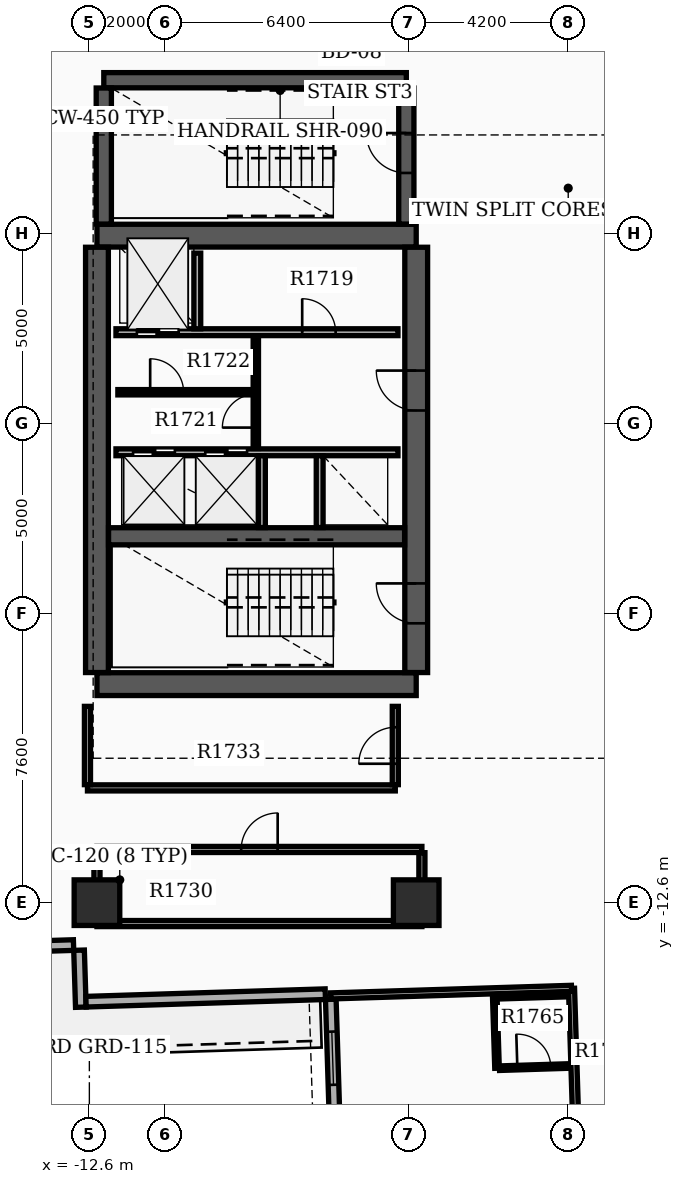
"""IFC4 building model, lengths in metres.
Left out: names, types, materials, properties, quantities, classifications, styles, units other than length and angle.
Written with IfcOpenShell. Run it as: python <this file> out.ifc"""

import sys

from ifc_helpers import new_model, si_unit, direction, frame, frame_2d, origin, origin_2d, place, context, subcontext, project, spatial, rectangle, extrude, element, fill, save


model = new_model("IFC4")
c1 = context("Model", 3, precision=1e-05, world=origin(), true_north=direction((0.0, 1.0)))
c2 = subcontext(c1, "Body", "Model", "MODEL_VIEW")
j1 = project(units=[si_unit("LENGTHUNIT", "METRE"), si_unit("PLANEANGLEUNIT", "RADIAN")], contexts=[c1])
p1 = place(None, origin())
s1 = spatial("IfcSite", under=j1, at=p1, CompositionType="ELEMENT")
p2 = place(p1, origin())
s2 = spatial("IfcBuilding", under=s1, at=p2, CompositionType="ELEMENT")
p3 = place(p2, frame((0.0, 0.0, 112.5)))
s3 = spatial("IfcBuildingStorey", under=s2, at=p3, CompositionType="ELEMENT", Elevation=112.5)
for number, where, z_axis, x_axis in (
    (1, (-12.4, -6.85, 0.0), (0.0, 0.0, 1.0), (1.0, 0.0, 0.0)),
    (2, (-12.4, 4.95, 0.0), (0.0, 0.0, 1.0), (1.0, 0.0, 0.0)),
):
    element("IfcWall", number, at=place(p3, frame(where, z_axis=z_axis, x_axis=x_axis)), inside=s3, PredefinedType="SHEAR", context=c2, shape_type="SweptSolid", body=[
        extrude(rectangle(XDim=8.4, YDim=0.6, at=frame_2d((4.2, 0.0))), origin(), (0.0, 0.0, 1.0), 3.7),
    ])
p4 = place(p3, frame((-12.4, -6.545, 0.0), z_axis=(0.0, 0.0, 1.0), x_axis=(0.0, 1.0, 0.0)))
e3 = element("IfcWall", 3, at=p4, inside=s3, PredefinedType="SHEAR", context=c2, shape_type="SweptSolid", body=[
    extrude(rectangle(XDim=11.19, YDim=0.6, at=frame_2d((5.595, 0.0))), origin(), (0.0, 0.0, 1.0), 3.7),
])
p5 = place(p3, frame((-4.0, -6.545, 0.0), z_axis=(0.0, 0.0, 1.0), x_axis=(0.0, 1.0, 0.0)))
e4 = element("IfcWall", 4, at=p5, inside=s3, PredefinedType="SHEAR", context=c2, shape_type="SweptSolid", body=[
    extrude(rectangle(XDim=11.19, YDim=0.6, at=frame_2d((5.595, 0.0))), origin(), (0.0, 0.0, 1.0), 3.7),
])
p6 = place(p5, frame((1.295, 0.0, 0.0)))
e5 = element("IfcOpeningElement", 5, at=p6, cuts=e4, PredefinedType="OPENING", context=c2, shape_type="SweptSolid", body=[
    extrude(rectangle(XDim=1.05, YDim=2.15, at=frame_2d((0.525, 1.075))), frame((0.0, 0.31, 0.0), z_axis=(0.0, -1.0, 0.0), x_axis=(1.0, 0.0, 0.0)), (0.0, 0.0, 1.0), 0.62),
])
p7 = place(p5, frame((6.895, 0.0, 0.0)))
e6 = element("IfcOpeningElement", 6, at=p7, cuts=e4, PredefinedType="OPENING", context=c2, shape_type="SweptSolid", body=[
    extrude(rectangle(XDim=1.05, YDim=2.15, at=frame_2d((0.525, 1.075))), frame((0.0, 0.31, 0.0), z_axis=(0.0, -1.0, 0.0), x_axis=(1.0, 0.0, 0.0)), (0.0, 0.0, 1.0), 0.62),
])
p8 = place(p3, frame((-12.095, -2.96, 0.0), z_axis=(0.0, 0.0, 1.0), x_axis=(1.0, 0.0, 0.0)))
e7 = element("IfcWall", 7, at=p8, inside=s3, PredefinedType="SHEAR", context=c2, shape_type="SweptSolid", body=[
    extrude(rectangle(XDim=7.79, YDim=0.45, at=frame_2d((3.895, 0.0))), origin(), (0.0, 0.0, 1.0), 3.7),
])
p9 = place(p3, frame((-12.22, 9.04, 0.0), z_axis=(0.0, 0.0, 1.0), x_axis=(1.0, 0.0, 0.0)))
e8 = element("IfcWall", 8, at=p9, inside=s3, PredefinedType="SHEAR", context=c2, shape_type="SweptSolid", body=[
    extrude(rectangle(XDim=7.96, YDim=0.4, at=frame_2d((3.98, 0.0))), origin(), (0.0, 0.0, 1.0), 3.7),
])
p10 = place(p3, frame((-12.22, 5.255, 0.0), z_axis=(0.0, 0.0, 1.0), x_axis=(0.0, 1.0, 0.0)))
e9 = element("IfcWall", 9, at=p10, inside=s3, PredefinedType="SHEAR", context=c2, shape_type="SweptSolid", body=[
    extrude(rectangle(XDim=3.58, YDim=0.4, at=frame_2d((1.79, 0.0))), origin(), (0.0, 0.0, 1.0), 3.7),
])
p11 = place(p3, frame((-4.26, 5.255, 0.0), z_axis=(0.0, 0.0, 1.0), x_axis=(0.0, 1.0, 0.0)))
e10 = element("IfcWall", 10, at=p11, inside=s3, PredefinedType="SHEAR", context=c2, shape_type="SweptSolid", body=[
    extrude(rectangle(XDim=3.58, YDim=0.4, at=frame_2d((1.79, 0.0))), origin(), (0.0, 0.0, 1.0), 3.7),
])
p12 = place(p11, frame((1.345, 0.0, 0.0)))
e11 = element("IfcOpeningElement", 11, at=p12, cuts=e10, PredefinedType="OPENING", context=c2, shape_type="SweptSolid", body=[
    extrude(rectangle(XDim=1.05, YDim=2.15, at=frame_2d((0.525, 1.075))), frame((0.0, 0.21, 0.0), z_axis=(0.0, -1.0, 0.0), x_axis=(1.0, 0.0, 0.0)), (0.0, 0.0, 1.0), 0.42),
])
for number, where, z_axis, x_axis in (
    (12, (-12.4, -12.6, 0.0), (0.0, 0.0, 1.0), (1.0, 0.0, 0.0)),
    (13, (-4.0, -12.6, 0.0), (0.0, 0.0, 1.0), (1.0, 0.0, 0.0)),
):
    element("IfcColumn", number, at=place(p3, frame(where, z_axis=z_axis, x_axis=x_axis)), inside=s3, PredefinedType="COLUMN", context=c2, shape_type="SweptSolid", body=[
        extrude(rectangle(XDim=1.2, YDim=1.2, at=origin_2d()), origin(), (0.0, 0.0, 1.0), 3.9),
    ])
p13 = place(p3, frame((-6.247, -15.144, 0.0), z_axis=(0.0, 0.0, 1.0), x_axis=(0.031398187845, -0.999506955354, 0.0)))
e14 = element("IfcWall", 14, at=p13, inside=s3, PredefinedType="STANDARD", context=c2, shape_type="SweptSolid", body=[
    extrude(rectangle(XDim=20.1, YDim=0.28, at=frame_2d((10.05, 0.0))), origin(), (0.0, 0.0, 1.0), 2.97),
])
p14 = place(p13, frame((0.85, 0.0, 0.8)))
e15 = element("IfcOpeningElement", 15, at=p14, cuts=e14, PredefinedType="OPENING", context=c2, shape_type="SweptSolid", body=[
    extrude(rectangle(XDim=1.4, YDim=1.6, at=frame_2d((0.7, 0.8))), frame((0.0, 0.15, 0.0), z_axis=(0.0, -1.0, 0.0), x_axis=(1.0, 0.0, 0.0)), (0.0, 0.0, 1.0), 0.3),
])
p15 = place(p13, frame((4.05, 0.0, 0.8)))
e16 = element("IfcOpeningElement", 16, at=p15, cuts=e14, PredefinedType="OPENING", context=c2, shape_type="SweptSolid", body=[
    extrude(rectangle(XDim=1.4, YDim=1.6, at=frame_2d((0.7, 0.8))), frame((0.0, 0.15, 0.0), z_axis=(0.0, -1.0, 0.0), x_axis=(1.0, 0.0, 0.0)), (0.0, 0.0, 1.0), 0.3),
])
p16 = place(p13, frame((7.25, 0.0, 0.8)))
e17 = element("IfcOpeningElement", 17, at=p16, cuts=e14, PredefinedType="OPENING", context=c2, shape_type="SweptSolid", body=[
    extrude(rectangle(XDim=1.4, YDim=1.6, at=frame_2d((0.7, 0.8))), frame((0.0, 0.15, 0.0), z_axis=(0.0, -1.0, 0.0), x_axis=(1.0, 0.0, 0.0)), (0.0, 0.0, 1.0), 0.3),
])
p17 = place(p13, frame((10.45, 0.0, 0.8)))
e18 = element("IfcOpeningElement", 18, at=p17, cuts=e14, PredefinedType="OPENING", context=c2, shape_type="SweptSolid", body=[
    extrude(rectangle(XDim=1.4, YDim=1.6, at=frame_2d((0.7, 0.8))), frame((0.0, 0.15, 0.0), z_axis=(0.0, -1.0, 0.0), x_axis=(1.0, 0.0, 0.0)), (0.0, 0.0, 1.0), 0.3),
])
p18 = place(p3, frame((-14.235, -13.754, 0.0), z_axis=(0.0, 0.0, 1.0), x_axis=(0.999506398264, 0.031415916822, 0.0)))
e19 = element("IfcWall", 19, at=p18, inside=s3, PredefinedType="STANDARD", context=c2, shape_type="SweptSolid", body=[
    extrude(rectangle(XDim=1.22, YDim=0.28, at=frame_2d((0.61, 0.0))), origin(), (0.0, 0.0, 1.0), 2.97),
])
p19 = place(p3, frame((-12.871, -13.851, 0.0), z_axis=(0.0, 0.0, 1.0), x_axis=(0.031412596484, -0.999506502621, 0.0)))
e20 = element("IfcWall", 20, at=p19, inside=s3, PredefinedType="STANDARD", context=c2, shape_type="SweptSolid", body=[
    extrude(rectangle(XDim=1.5, YDim=0.28, at=frame_2d((0.75, 0.0))), origin(), (0.0, 0.0, 1.0), 2.97),
])
p20 = place(p3, frame((-12.689, -15.206, 0.0), z_axis=(0.0, 0.0, 1.0), x_axis=(0.999507262922, 0.031388395416, 0.0)))
e21 = element("IfcWall", 21, at=p20, inside=s3, PredefinedType="STANDARD", context=c2, shape_type="SweptSolid", body=[
    extrude(rectangle(XDim=6.3, YDim=0.28, at=frame_2d((3.15, 0.0))), origin(), (0.0, 0.0, 1.0), 2.97),
])
p21 = place(p3, frame((-11.9, 2.41, 0.0), z_axis=(0.0, 0.0, 1.0), x_axis=(1.0, 0.0, 0.0)))
e22 = element("IfcWall", 22, at=p21, inside=s3, PredefinedType="SOLIDWALL", context=c2, shape_type="SweptSolid", body=[
    extrude(rectangle(XDim=7.42, YDim=0.18, at=frame_2d((3.71, 0.0))), origin(), (0.0, 0.0, 1.0), 2.96),
])
p22 = place(p21, frame((0.55, 0.0, 0.0)))
e23 = element("IfcOpeningElement", 23, at=p22, cuts=e22, PredefinedType="OPENING", context=c2, shape_type="SweptSolid", body=[
    extrude(rectangle(XDim=1.1, YDim=2.15, at=frame_2d((0.55, 1.075))), frame((0.0, 0.1, 0.0), z_axis=(0.0, -1.0, 0.0), x_axis=(1.0, 0.0, 0.0)), (0.0, 0.0, 1.0), 0.2),
])
p23 = place(p21, frame((4.9, 0.0, 0.0)))
e24 = element("IfcOpeningElement", 24, at=p23, cuts=e22, PredefinedType="OPENING", context=c2, shape_type="SweptSolid", body=[
    extrude(rectangle(XDim=0.88, YDim=2.1, at=frame_2d((0.44, 1.05))), frame((0.0, 0.1, 0.0), z_axis=(0.0, -1.0, 0.0), x_axis=(1.0, 0.0, 0.0)), (0.0, 0.0, 1.0), 0.2),
])
p24 = place(p3, frame((-11.9, -0.75, 0.0), z_axis=(0.0, 0.0, 1.0), x_axis=(1.0, 0.0, 0.0)))
e25 = element("IfcWall", 25, at=p24, inside=s3, PredefinedType="SOLIDWALL", context=c2, shape_type="SweptSolid", body=[
    extrude(rectangle(XDim=7.42, YDim=0.18, at=frame_2d((3.71, 0.0))), origin(), (0.0, 0.0, 1.0), 2.96),
])
p25 = place(p24, frame((0.45, 0.0, 0.0)))
e26 = element("IfcOpeningElement", 26, at=p25, cuts=e25, PredefinedType="OPENING", context=c2, shape_type="SweptSolid", body=[
    extrude(rectangle(XDim=1.1, YDim=2.15, at=frame_2d((0.55, 1.075))), frame((0.0, 0.1, 0.0), z_axis=(0.0, -1.0, 0.0), x_axis=(1.0, 0.0, 0.0)), (0.0, 0.0, 1.0), 0.2),
])
p26 = place(p24, frame((2.35, 0.0, 0.0)))
e27 = element("IfcOpeningElement", 27, at=p26, cuts=e25, PredefinedType="OPENING", context=c2, shape_type="SweptSolid", body=[
    extrude(rectangle(XDim=1.1, YDim=2.15, at=frame_2d((0.55, 1.075))), frame((0.0, 0.1, 0.0), z_axis=(0.0, -1.0, 0.0), x_axis=(1.0, 0.0, 0.0)), (0.0, 0.0, 1.0), 0.2),
])
p27 = place(p3, frame((-9.76, 2.5, 0.0), z_axis=(0.0, 0.0, 1.0), x_axis=(0.0, 1.0, 0.0)))
e28 = element("IfcWall", 28, at=p27, inside=s3, PredefinedType="SOLIDWALL", context=c2, shape_type="SweptSolid", body=[
    extrude(rectangle(XDim=1.99, YDim=0.18, at=frame_2d((0.995, 0.0))), origin(), (0.0, 0.0, 1.0), 2.96),
])
for number, where, z_axis, x_axis in (
    (29, (-8.06, -2.73, 0.0), (0.0, 0.0, 1.0), (0.0, 1.0, 0.0)),
    (30, (-6.54, -2.73, 0.0), (0.0, 0.0, 1.0), (0.0, 1.0, 0.0)),
):
    element("IfcWall", number, at=place(p3, frame(where, z_axis=z_axis, x_axis=x_axis)), inside=s3, PredefinedType="SOLIDWALL", context=c2, shape_type="SweptSolid", body=[
        extrude(rectangle(XDim=1.89, YDim=0.18, at=frame_2d((0.945, 0.0))), origin(), (0.0, 0.0, 1.0), 2.96),
    ])
p28 = place(p3, frame((-8.22, -0.65, 0.0), z_axis=(0.0, 0.0, 1.0), x_axis=(0.0, 1.0, 0.0)))
e31 = element("IfcWall", 31, at=p28, inside=s3, PredefinedType="SOLIDWALL", context=c2, shape_type="SweptSolid", body=[
    extrude(rectangle(XDim=2.96, YDim=0.14, at=frame_2d((1.48, 0.0))), origin(), (0.0, 0.0, 1.0), 2.96),
])
p29 = place(p28, frame((0.55, 0.0, 0.0)))
e32 = element("IfcOpeningElement", 32, at=p29, cuts=e31, PredefinedType="OPENING", context=c2, shape_type="SweptSolid", body=[
    extrude(rectangle(XDim=0.88, YDim=2.1, at=frame_2d((0.44, 1.05))), frame((0.0, 0.08, 0.0), z_axis=(0.0, -1.0, 0.0), x_axis=(1.0, 0.0, 0.0)), (0.0, 0.0, 1.0), 0.16),
])
p30 = place(p3, frame((-11.85, 0.83, 0.0), z_axis=(0.0, 0.0, 1.0), x_axis=(1.0, 0.0, 0.0)))
e33 = element("IfcWall", 33, at=p30, inside=s3, PredefinedType="PARTITIONING", context=c2, shape_type="SweptSolid", body=[
    extrude(rectangle(XDim=3.552, YDim=0.14, at=frame_2d((1.776, 0.0))), origin(), (0.0, 0.0, 1.0), 2.96),
])
p31 = place(p30, frame((0.85, 0.0, 0.0)))
e34 = element("IfcOpeningElement", 34, at=p31, cuts=e33, PredefinedType="OPENING", context=c2, shape_type="SweptSolid", body=[
    extrude(rectangle(XDim=0.88, YDim=2.1, at=frame_2d((0.44, 1.05))), frame((0.0, 0.08, 0.0), z_axis=(0.0, -1.0, 0.0), x_axis=(1.0, 0.0, 0.0)), (0.0, 0.0, 1.0), 0.16),
])
p32 = place(p3, frame((-12.4, -13.15, 0.0), z_axis=(0.0, 0.0, 1.0), x_axis=(1.0, 0.0, 0.0)))
e35 = element("IfcWall", 35, at=p32, inside=s3, PredefinedType="PARTITIONING", context=c2, shape_type="SweptSolid", body=[
    extrude(rectangle(XDim=8.55, YDim=0.16, at=frame_2d((4.275, 0.0))), origin(), (0.0, 0.0, 1.0), 2.96),
])
p33 = place(p3, frame((-12.4, -11.2, 0.0), z_axis=(0.0, 0.0, 1.0), x_axis=(1.0, 0.0, 0.0)))
e36 = element("IfcWall", 36, at=p33, inside=s3, PredefinedType="PARTITIONING", context=c2, shape_type="SweptSolid", body=[
    extrude(rectangle(XDim=8.55, YDim=0.16, at=frame_2d((4.275, 0.0))), origin(), (0.0, 0.0, 1.0), 2.96),
])
p34 = place(p33, frame((3.795, 0.0, 0.0)))
e37 = element("IfcOpeningElement", 37, at=p34, cuts=e36, PredefinedType="OPENING", context=c2, shape_type="SweptSolid", body=[
    extrude(rectangle(XDim=0.96, YDim=2.15, at=frame_2d((0.48, 1.075))), frame((0.0, 0.09, 0.0), z_axis=(0.0, -1.0, 0.0), x_axis=(1.0, 0.0, 0.0)), (0.0, 0.0, 1.0), 0.18),
])
for number, where, z_axis, x_axis in (
    (38, (-12.4, -13.065, 0.0), (0.0, 0.0, 1.0), (0.0, 1.0, 0.0)),
    (39, (-3.85, -13.065, 0.0), (0.0, 0.0, 1.0), (0.0, 1.0, 0.0)),
):
    element("IfcWall", number, at=place(p3, frame(where, z_axis=z_axis, x_axis=x_axis)), inside=s3, PredefinedType="PARTITIONING", context=c2, shape_type="SweptSolid", body=[
        extrude(rectangle(XDim=1.78, YDim=0.16, at=frame_2d((0.89, 0.0))), origin(), (0.0, 0.0, 1.0), 2.96),
    ])
p35 = place(p3, frame((-12.65, -9.58, 0.0), z_axis=(0.0, 0.0, 1.0), x_axis=(1.0, 0.0, 0.0)))
e40 = element("IfcWall", 40, at=p35, inside=s3, PredefinedType="PARTITIONING", context=c2, shape_type="SweptSolid", body=[
    extrude(rectangle(XDim=8.1, YDim=0.16, at=frame_2d((4.05, 0.0))), origin(), (0.0, 0.0, 1.0), 2.96),
])
p36 = place(p3, frame((-12.65, -9.495, 0.0), z_axis=(0.0, 0.0, 1.0), x_axis=(0.0, 1.0, 0.0)))
e41 = element("IfcWall", 41, at=p36, inside=s3, PredefinedType="PARTITIONING", context=c2, shape_type="SweptSolid", body=[
    extrude(rectangle(XDim=2.06, YDim=0.16, at=frame_2d((1.03, 0.0))), origin(), (0.0, 0.0, 1.0), 2.96),
])
p37 = place(p3, frame((-4.55, -9.495, 0.0), z_axis=(0.0, 0.0, 1.0), x_axis=(0.0, 1.0, 0.0)))
e42 = element("IfcWall", 42, at=p37, inside=s3, PredefinedType="PARTITIONING", context=c2, shape_type="SweptSolid", body=[
    extrude(rectangle(XDim=2.06, YDim=0.16, at=frame_2d((1.03, 0.0))), origin(), (0.0, 0.0, 1.0), 2.96),
])
p38 = place(p37, frame((0.55, 0.0, 0.0)))
e43 = element("IfcOpeningElement", 43, at=p38, cuts=e42, PredefinedType="OPENING", context=c2, shape_type="SweptSolid", body=[
    extrude(rectangle(XDim=0.96, YDim=2.15, at=frame_2d((0.48, 1.075))), frame((0.0, 0.09, 0.0), z_axis=(0.0, -1.0, 0.0), x_axis=(1.0, 0.0, 0.0)), (0.0, 0.0, 1.0), 0.18),
])
p39 = place(p3, frame((0.087, -14.854, 0.0), z_axis=(0.0, 0.0, 1.0), x_axis=(0.031410762168, -0.999506560269, 0.0)))
e44 = element("IfcWall", 44, at=p39, inside=s3, PredefinedType="PARTITIONING", context=c2, shape_type="SweptSolid", body=[
    extrude(rectangle(XDim=9.7, YDim=0.16, at=frame_2d((4.85, 0.0))), origin(), (0.0, 0.0, 1.0), 2.96),
])
p40 = place(p39, frame((7.704, 0.0, 0.0)))
e45 = element("IfcOpeningElement", 45, at=p40, cuts=e44, PredefinedType="OPENING", context=c2, shape_type="SweptSolid", body=[
    extrude(rectangle(XDim=0.96, YDim=2.15, at=frame_2d((0.48, 1.075))), frame((0.0, 0.09, 0.0), z_axis=(0.0, -1.0, 0.0), x_axis=(1.0, 0.0, 0.0)), (0.0, 0.0, 1.0), 0.18),
])
p41 = place(p3, frame((0.087, -14.854, 0.0), z_axis=(0.0, 0.0, 1.0), x_axis=(-0.999506197806, -0.031422293782, 0.0)))
e46 = element("IfcWall", 46, at=p41, inside=s3, PredefinedType="PARTITIONING", context=c2, shape_type="SweptSolid", body=[
    extrude(rectangle(XDim=6.34, YDim=0.16, at=frame_2d((3.17, 0.0))), origin(), (0.0, 0.0, 1.0), 2.96),
])
p42 = place(p3, frame((-1.808, -16.955, 0.0), z_axis=(0.0, 0.0, 1.0), x_axis=(0.999507221803, 0.031389704724, 0.0)))
e47 = element("IfcWall", 47, at=p42, inside=s3, PredefinedType="PARTITIONING", context=c2, shape_type="SweptSolid", body=[
    extrude(rectangle(XDim=1.82, YDim=0.12, at=frame_2d((0.91, 0.0))), origin(), (0.0, 0.0, 1.0), 2.96),
])
p43 = place(p42, frame((0.47, 0.0, 0.0)))
e48 = element("IfcOpeningElement", 48, at=p43, cuts=e47, PredefinedType="OPENING", context=c2, shape_type="SweptSolid", body=[
    extrude(rectangle(XDim=0.88, YDim=2.1, at=frame_2d((0.44, 1.05))), frame((0.0, 0.07, 0.0), z_axis=(0.0, -1.0, 0.0), x_axis=(1.0, 0.0, 0.0)), (0.0, 0.0, 1.0), 0.14),
])
p44 = place(p3, frame((-1.867, -15.076, 0.0), z_axis=(0.0, 0.0, 1.0), x_axis=(0.999503004171, 0.03152371574, 0.0)))
e49 = element("IfcWall", 49, at=p44, inside=s3, PredefinedType="PARTITIONING", context=c2, shape_type="SweptSolid", body=[
    extrude(rectangle(XDim=1.82, YDim=0.12, at=frame_2d((0.91, 0.0))), origin(), (0.0, 0.0, 1.0), 2.96),
])
p45 = place(p3, frame((-1.932, -15.078, 0.0), z_axis=(0.0, 0.0, 1.0), x_axis=(0.031425292588, -0.999506103526, 0.0)))
e50 = element("IfcWall", 50, at=p45, inside=s3, PredefinedType="PARTITIONING", context=c2, shape_type="SweptSolid", body=[
    extrude(rectangle(XDim=1.88, YDim=0.12, at=frame_2d((0.94, 0.0))), origin(), (0.0, 0.0, 1.0), 2.96),
])
p46 = place(p14, origin())
e51 = element("IfcWindow", 51, at=p46, inside=s3, PartitioningType="SINGLE_PANEL", PredefinedType="WINDOW", context=c2, shape_type="SweptSolid", body=[
    extrude(rectangle(XDim=1.4, YDim=1.6, at=frame_2d((0.7, 0.8))), frame((0.0, 0.03, 0.0), z_axis=(0.0, -1.0, 0.0), x_axis=(1.0, 0.0, 0.0)), (0.0, 0.0, 1.0), 0.06),
])
fill(e15, e51)
p47 = place(p6, origin())
e52 = element("IfcDoor", 52, at=p47, inside=s3, OperationType="SINGLE_SWING_RIGHT", PredefinedType="DOOR", context=c2, shape_type="SweptSolid", body=[
    extrude(rectangle(XDim=1.05, YDim=2.15, at=frame_2d((0.525, 1.075))), frame((0.0, 0.025, 0.0), z_axis=(0.0, -1.0, 0.0), x_axis=(1.0, 0.0, 0.0)), (0.0, 0.0, 1.0), 0.05),
])
fill(e5, e52)
p48 = place(p7, origin())
e53 = element("IfcDoor", 53, at=p48, inside=s3, OperationType="SINGLE_SWING_RIGHT", PredefinedType="DOOR", context=c2, shape_type="SweptSolid", body=[
    extrude(rectangle(XDim=1.05, YDim=2.15, at=frame_2d((0.525, 1.075))), frame((0.0, 0.025, 0.0), z_axis=(0.0, -1.0, 0.0), x_axis=(1.0, 0.0, 0.0)), (0.0, 0.0, 1.0), 0.05),
])
fill(e6, e53)
p49 = place(p12, origin())
e54 = element("IfcDoor", 54, at=p49, inside=s3, OperationType="SINGLE_SWING_RIGHT", PredefinedType="DOOR", context=c2, shape_type="SweptSolid", body=[
    extrude(rectangle(XDim=1.05, YDim=2.15, at=frame_2d((0.525, 1.075))), frame((0.0, 0.025, 0.0), z_axis=(0.0, -1.0, 0.0), x_axis=(1.0, 0.0, 0.0)), (0.0, 0.0, 1.0), 0.05),
])
fill(e11, e54)
p50 = place(p22, origin())
e55 = element("IfcDoor", 55, at=p50, inside=s3, OperationType="DOUBLE_DOOR_SLIDING", PredefinedType="DOOR", context=c2, shape_type="SweptSolid", body=[
    extrude(rectangle(XDim=1.1, YDim=2.15, at=frame_2d((0.55, 1.075))), frame((0.0, 0.025, 0.0), z_axis=(0.0, -1.0, 0.0), x_axis=(1.0, 0.0, 0.0)), (0.0, 0.0, 1.0), 0.05),
])
fill(e23, e55)
p51 = place(p25, origin())
e56 = element("IfcDoor", 56, at=p51, inside=s3, OperationType="DOUBLE_DOOR_SLIDING", PredefinedType="DOOR", context=c2, shape_type="SweptSolid", body=[
    extrude(rectangle(XDim=1.1, YDim=2.15, at=frame_2d((0.55, 1.075))), frame((0.0, 0.025, 0.0), z_axis=(0.0, -1.0, 0.0), x_axis=(1.0, 0.0, 0.0)), (0.0, 0.0, 1.0), 0.05),
])
fill(e26, e56)
p52 = place(p26, origin())
e57 = element("IfcDoor", 57, at=p52, inside=s3, OperationType="DOUBLE_DOOR_SLIDING", PredefinedType="DOOR", context=c2, shape_type="SweptSolid", body=[
    extrude(rectangle(XDim=1.1, YDim=2.15, at=frame_2d((0.55, 1.075))), frame((0.0, 0.025, 0.0), z_axis=(0.0, -1.0, 0.0), x_axis=(1.0, 0.0, 0.0)), (0.0, 0.0, 1.0), 0.05),
])
fill(e27, e57)
p53 = place(p23, origin())
e58 = element("IfcDoor", 58, at=p53, inside=s3, OperationType="SINGLE_SWING_LEFT", PredefinedType="DOOR", context=c2, shape_type="SweptSolid", body=[
    extrude(rectangle(XDim=0.88, YDim=2.1, at=frame_2d((0.44, 1.05))), frame((0.0, 0.025, 0.0), z_axis=(0.0, -1.0, 0.0), x_axis=(1.0, 0.0, 0.0)), (0.0, 0.0, 1.0), 0.05),
])
fill(e24, e58)
p54 = place(p29, origin())
e59 = element("IfcDoor", 59, at=p54, inside=s3, OperationType="SINGLE_SWING_LEFT", PredefinedType="DOOR", context=c2, shape_type="SweptSolid", body=[
    extrude(rectangle(XDim=0.88, YDim=2.1, at=frame_2d((0.44, 1.05))), frame((0.0, 0.025, 0.0), z_axis=(0.0, -1.0, 0.0), x_axis=(1.0, 0.0, 0.0)), (0.0, 0.0, 1.0), 0.05),
])
fill(e32, e59)
p55 = place(p31, origin())
e60 = element("IfcDoor", 60, at=p55, inside=s3, OperationType="SINGLE_SWING_LEFT", PredefinedType="DOOR", context=c2, shape_type="SweptSolid", body=[
    extrude(rectangle(XDim=0.88, YDim=2.1, at=frame_2d((0.44, 1.05))), frame((0.0, 0.025, 0.0), z_axis=(0.0, -1.0, 0.0), x_axis=(1.0, 0.0, 0.0)), (0.0, 0.0, 1.0), 0.05),
])
fill(e34, e60)
p56 = place(p34, origin())
e61 = element("IfcDoor", 61, at=p56, inside=s3, OperationType="SINGLE_SWING_RIGHT", PredefinedType="DOOR", context=c2, shape_type="SweptSolid", body=[
    extrude(rectangle(XDim=0.96, YDim=2.15, at=frame_2d((0.48, 1.075))), frame((0.0, 0.025, 0.0), z_axis=(0.0, -1.0, 0.0), x_axis=(1.0, 0.0, 0.0)), (0.0, 0.0, 1.0), 0.05),
])
fill(e37, e61)
p57 = place(p38, origin())
e62 = element("IfcDoor", 62, at=p57, inside=s3, OperationType="SINGLE_SWING_LEFT", PredefinedType="DOOR", context=c2, shape_type="SweptSolid", body=[
    extrude(rectangle(XDim=0.96, YDim=2.15, at=frame_2d((0.48, 1.075))), frame((0.0, 0.025, 0.0), z_axis=(0.0, -1.0, 0.0), x_axis=(1.0, 0.0, 0.0)), (0.0, 0.0, 1.0), 0.05),
])
fill(e43, e62)
p58 = place(p43, origin())
e63 = element("IfcDoor", 63, at=p58, inside=s3, OperationType="SINGLE_SWING_LEFT", PredefinedType="DOOR", context=c2, shape_type="SweptSolid", body=[
    extrude(rectangle(XDim=0.88, YDim=2.1, at=frame_2d((0.44, 1.05))), frame((0.0, 0.025, 0.0), z_axis=(0.0, -1.0, 0.0), x_axis=(1.0, 0.0, 0.0)), (0.0, 0.0, 1.0), 0.05),
])
fill(e48, e63)
save(model, sys.argv[1])
